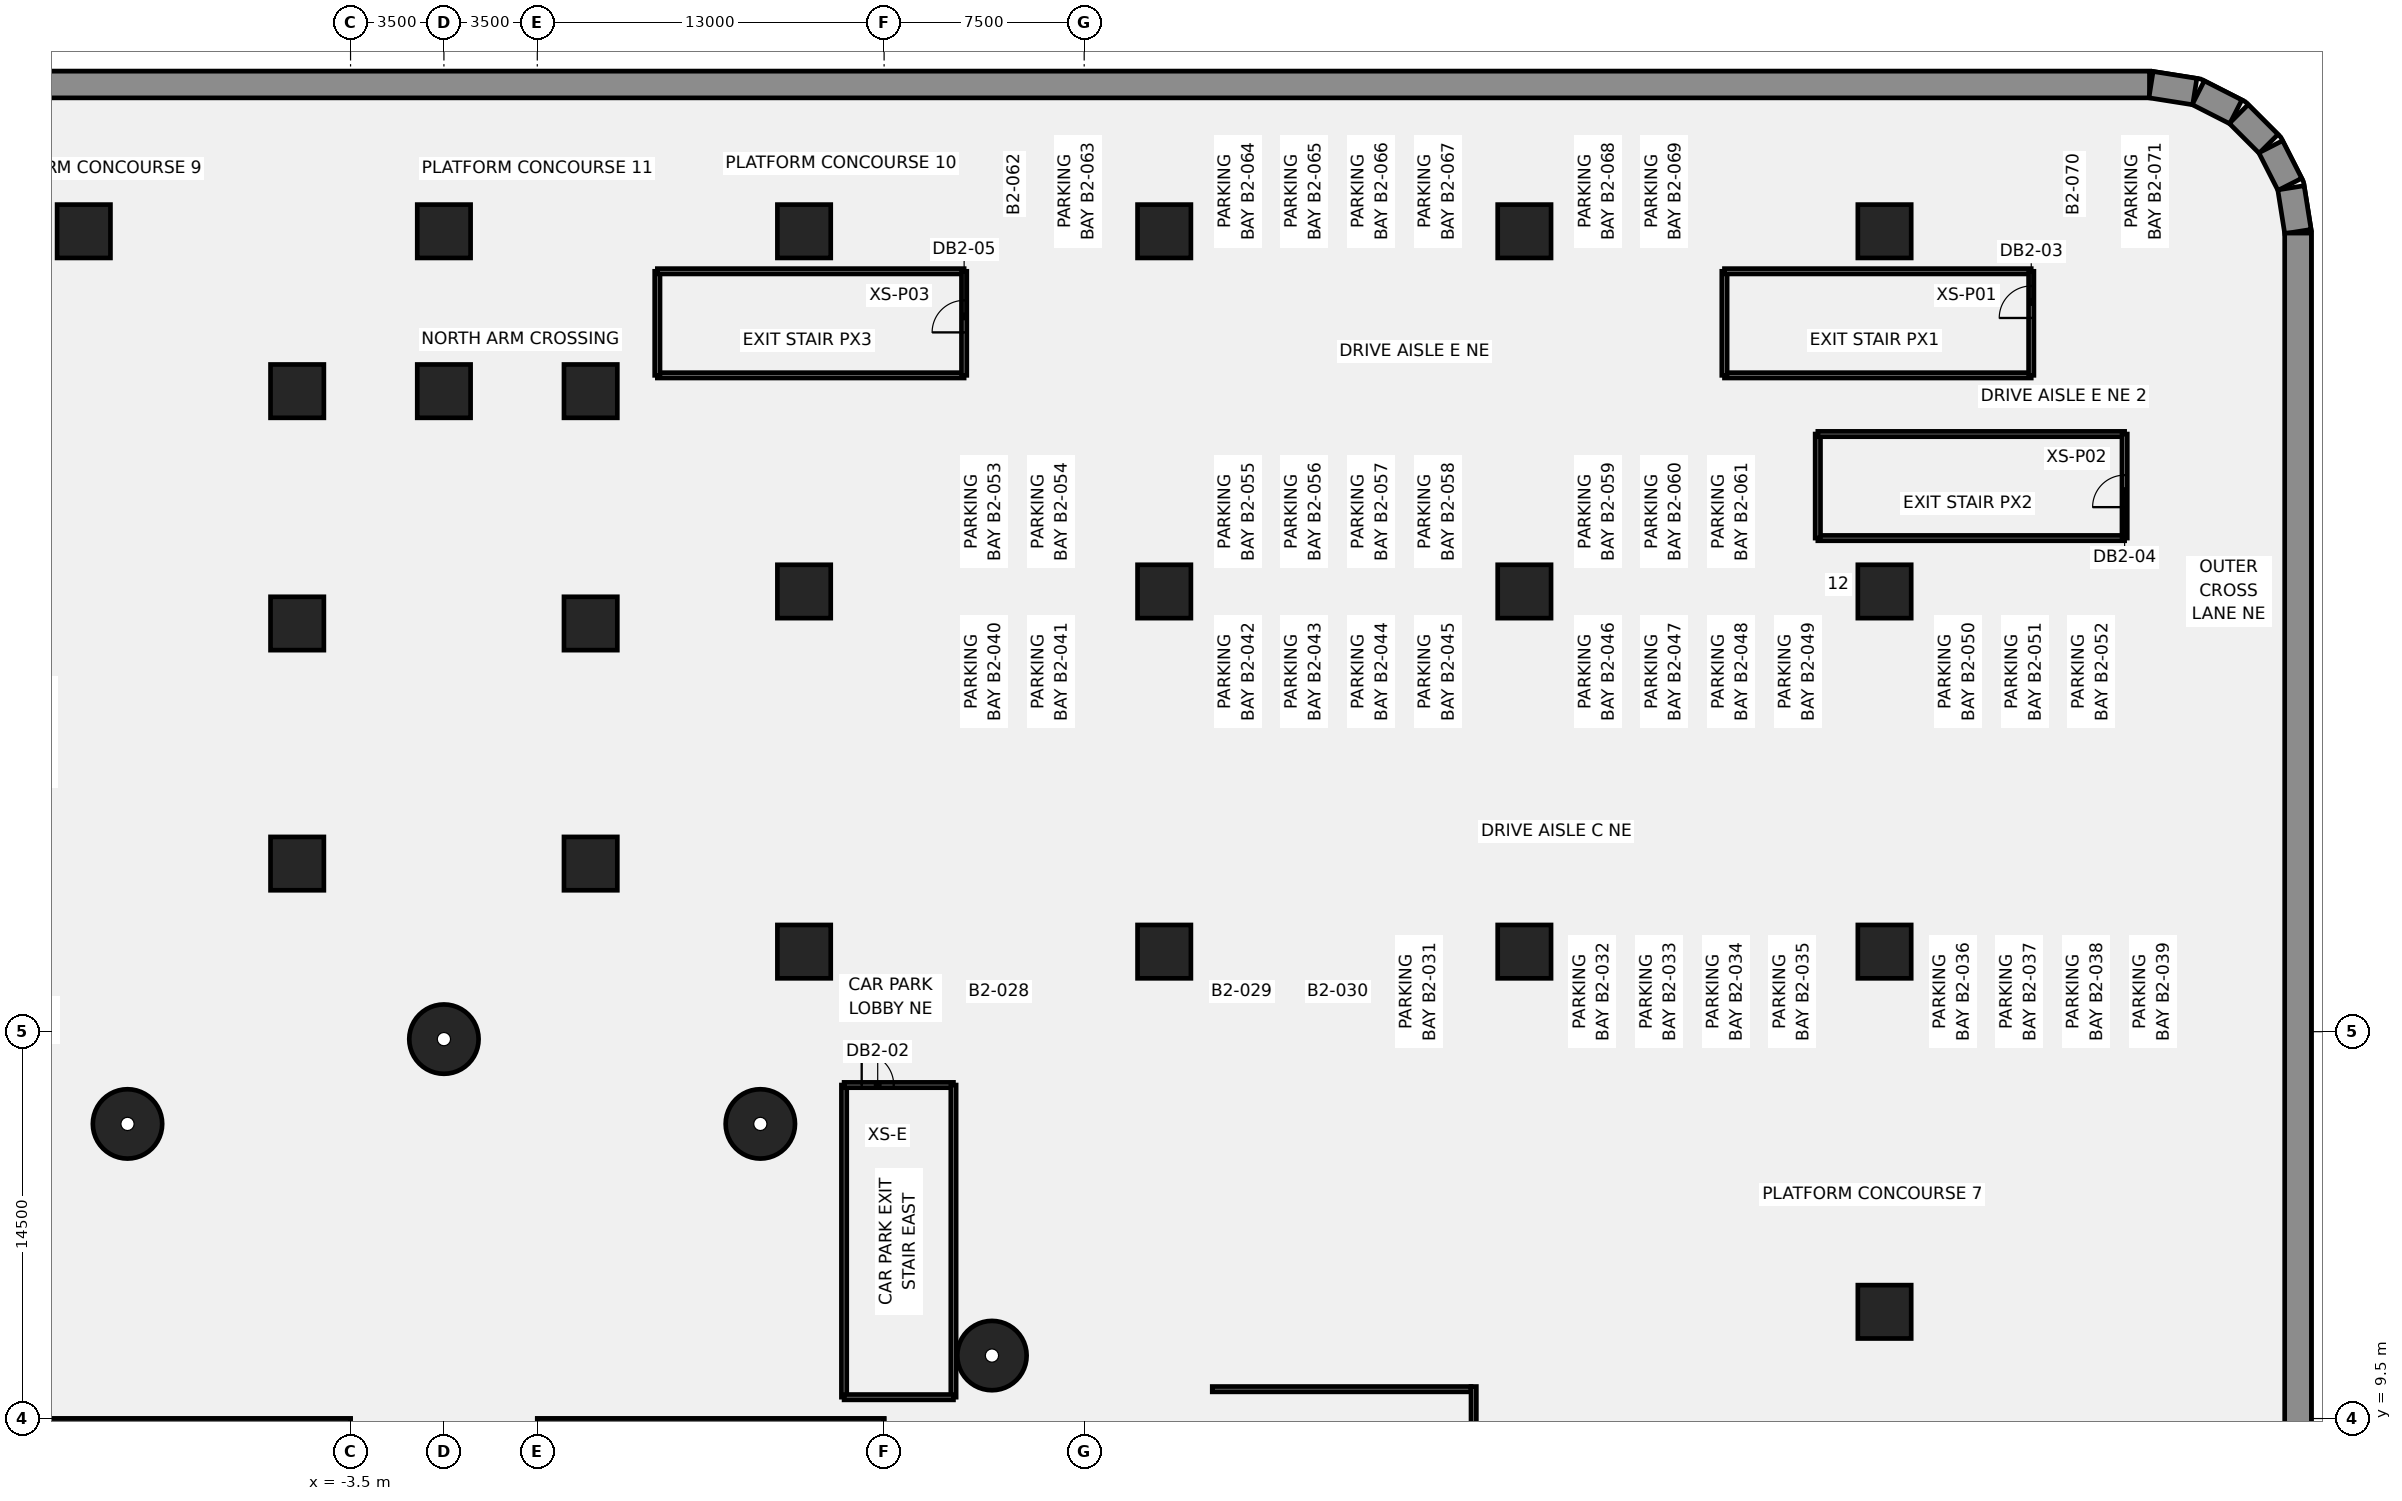
"""IFC4 building model, lengths in metres.
Left out: names, types, materials, properties, quantities, classifications, styles, units other than length and angle.
Written with IfcOpenShell. Run it as: python <this file> out.ifc"""

import sys

from ifc_helpers import new_model, si_unit, direction, frame, frame_2d, origin, origin_2d, place, context, subcontext, project, spatial, rectangle, circle, extrude, element, fill, save


model = new_model("IFC4")
c1 = context("Model", 3, precision=1e-05, world=origin(), true_north=direction((0.0, 1.0)))
c2 = subcontext(c1, "Body", "Model", "MODEL_VIEW")
j1 = project(units=[si_unit("LENGTHUNIT", "METRE"), si_unit("PLANEANGLEUNIT", "RADIAN")], contexts=[c1])
p1 = place(None, origin())
s1 = spatial("IfcSite", under=j1, at=p1, CompositionType="ELEMENT")
p2 = place(p1, origin())
s2 = spatial("IfcBuilding", under=s1, at=p2, CompositionType="ELEMENT")
p3 = place(p2, frame((0.0, 0.0, -14.0)))
s3 = spatial("IfcBuildingStorey", under=s2, at=p3, CompositionType="ELEMENT", Elevation=-14.0)
p4 = place(p3, frame((-63.931, 59.5, -0.45), z_axis=(0.0, 0.0, 1.0), x_axis=(1.0, 0.0, 0.0)))
e1 = element("IfcWall", 1, at=p4, inside=s3, PredefinedType="SOLIDWALL", context=c2, shape_type="SweptSolid", body=[
    extrude(rectangle(XDim=127.863, YDim=1.0, at=frame_2d((63.931, 0.0))), origin(), (0.0, 0.0, 1.0), 7.0),
])
p5 = place(p3, frame((63.99, 59.495, -0.45), z_axis=(0.0, 0.0, 1.0), x_axis=(0.987688946427, -0.156430639922, 0.0)))
e2 = element("IfcWall", 2, at=p5, inside=s3, PredefinedType="SOLIDWALL", context=c2, shape_type="SweptSolid", body=[
    extrude(rectangle(XDim=1.661, YDim=1.0, at=frame_2d((0.83, 0.0))), origin(), (0.0, 0.0, 1.0), 7.0),
])
for number, where, z_axis, x_axis in (
    (3, (65.759, 59.194, -0.45), (0.0, 0.0, 1.0), (0.891, -0.454, 0.0)),
    (4, (67.278, 58.396, -0.45), (0.0, 0.0, 1.0), (0.707, -0.707, 0.0)),
    (5, (68.476, 57.168, -0.45), (0.0, 0.0, 1.0), (0.454, -0.891, 0.0)),
):
    element("IfcWall", number, at=place(p3, frame(where, z_axis=z_axis, x_axis=x_axis)), inside=s3, PredefinedType="SOLIDWALL", context=c2, shape_type="SweptSolid", body=[
        extrude(rectangle(XDim=1.581, YDim=1.0, at=frame_2d((0.791, 0.0))), origin(), (0.0, 0.0, 1.0), 7.0),
    ])
p6 = place(p3, frame((69.236, 55.63, -0.45), z_axis=(0.0, 0.0, 1.0), x_axis=(0.156430639922, -0.987688946427, 0.0)))
e6 = element("IfcWall", 6, at=p6, inside=s3, PredefinedType="SOLIDWALL", context=c2, shape_type="SweptSolid", body=[
    extrude(rectangle(XDim=1.661, YDim=1.0, at=frame_2d((0.83, 0.0))), origin(), (0.0, 0.0, 1.0), 7.0),
])
p7 = place(p3, frame((69.5, 53.931, -0.45), z_axis=(0.0, 0.0, 1.0), x_axis=(0.0, -1.0, 0.0)))
e7 = element("IfcWall", 7, at=p7, inside=s3, PredefinedType="SOLIDWALL", context=c2, shape_type="SweptSolid", body=[
    extrude(rectangle(XDim=107.863, YDim=1.0, at=frame_2d((53.931, 0.0))), origin(), (0.0, 0.0, 1.0), 7.0),
])
for number, where, z_axis, x_axis in (
    (8, (20.543, 11.86, -0.45), (0.0, 0.0, 1.0), (1.0, 0.0, 0.0)),
    (9, (11.86, 20.543, -0.45), (0.0, 0.0, 1.0), (1.0, 0.0, 0.0)),
    (10, (0.0, 23.721, -0.45), (0.0, 0.0, 1.0), (1.0, 0.0, 0.0)),
    (11, (-11.86, 20.543, -0.45), (0.0, 0.0, 1.0), (1.0, 0.0, 0.0)),
):
    element("IfcColumn", number, at=place(p3, frame(where, z_axis=z_axis, x_axis=x_axis)), inside=s3, PredefinedType="COLUMN", context=c2, shape_type="SweptSolid", body=[
        extrude(circle(Radius=1.3, at=origin_2d()), origin(), (0.0, 0.0, 1.0), 7.0),
    ])
for number, where, z_axis, x_axis in (
    (12, (-5.5, 39.3, -0.45), (0.0, 0.0, 1.0), (1.0, 0.0, 0.0)),
    (13, (5.5, 39.3, -0.45), (0.0, 0.0, 1.0), (1.0, 0.0, 0.0)),
    (14, (-5.5, 30.3, -0.45), (0.0, 0.0, 1.0), (1.0, 0.0, 0.0)),
    (15, (5.5, 30.3, -0.45), (0.0, 0.0, 1.0), (1.0, 0.0, 0.0)),
    (16, (5.5, 48.008, -0.45), (0.0, 0.0, 1.0), (1.0, 0.0, 0.0)),
    (17, (0.0, 48.008, -0.45), (0.0, 0.0, 1.0), (1.0, 0.0, 0.0)),
    (18, (-5.5, 48.008, -0.45), (0.0, 0.0, 1.0), (1.0, 0.0, 0.0)),
    (19, (-13.5, 54.0, -0.45), (0.0, 0.0, 1.0), (1.0, 0.0, 0.0)),
    (20, (0.0, 54.0, -0.45), (0.0, 0.0, 1.0), (1.0, 0.0, 0.0)),
    (21, (13.5, 27.0, -0.45), (0.0, 0.0, 1.0), (1.0, 0.0, 0.0)),
    (22, (13.5, 40.5, -0.45), (0.0, 0.0, 1.0), (1.0, 0.0, 0.0)),
    (23, (13.5, 54.0, -0.45), (0.0, 0.0, 1.0), (1.0, 0.0, 0.0)),
    (24, (27.0, 27.0, -0.45), (0.0, 0.0, 1.0), (1.0, 0.0, 0.0)),
    (25, (27.0, 40.5, -0.45), (0.0, 0.0, 1.0), (1.0, 0.0, 0.0)),
    (26, (27.0, 54.0, -0.45), (0.0, 0.0, 1.0), (1.0, 0.0, 0.0)),
    (27, (40.5, 27.0, -0.45), (0.0, 0.0, 1.0), (1.0, 0.0, 0.0)),
    (28, (40.5, 40.5, -0.45), (0.0, 0.0, 1.0), (1.0, 0.0, 0.0)),
    (29, (40.5, 54.0, -0.45), (0.0, 0.0, 1.0), (1.0, 0.0, 0.0)),
    (30, (54.0, 13.5, -0.45), (0.0, 0.0, 1.0), (1.0, 0.0, 0.0)),
    (31, (54.0, 27.0, -0.45), (0.0, 0.0, 1.0), (1.0, 0.0, 0.0)),
    (32, (54.0, 40.5, -0.45), (0.0, 0.0, 1.0), (1.0, 0.0, 0.0)),
    (33, (54.0, 54.0, -0.45), (0.0, 0.0, 1.0), (1.0, 0.0, 0.0)),
):
    element("IfcColumn", number, at=place(p3, frame(where, z_axis=z_axis, x_axis=x_axis)), inside=s3, PredefinedType="COLUMN", context=c2, shape_type="SweptSolid", body=[
        extrude(rectangle(XDim=2.0, YDim=2.0, at=origin_2d()), origin(), (0.0, 0.0, 1.0), 7.0),
    ])
p8 = place(p3, frame((15.0, 10.3, 0.0), z_axis=(0.0, 0.0, 1.0), x_axis=(0.0, 1.0, 0.0)))
e34 = element("IfcWall", 34, at=p8, inside=s3, PredefinedType="PARTITIONING", context=c2, shape_type="SweptSolid", body=[
    extrude(rectangle(XDim=11.7, YDim=0.2, at=frame_2d((5.85, 0.0))), origin(), (0.0, 0.0, 1.0), 6.55),
])
p9 = place(p3, frame((15.0, 22.0, 0.0), z_axis=(0.0, 0.0, 1.0), x_axis=(1.0, 0.0, 0.0)))
e35 = element("IfcWall", 35, at=p9, inside=s3, PredefinedType="PARTITIONING", context=c2, shape_type="SweptSolid", body=[
    extrude(rectangle(XDim=4.1, YDim=0.2, at=frame_2d((2.05, 0.0))), origin(), (0.0, 0.0, 1.0), 6.55),
])
p10 = place(p9, frame((0.66, 0.0, 0.0)))
e36 = element("IfcOpeningElement", 36, at=p10, cuts=e35, PredefinedType="OPENING", context=c2, shape_type="SweptSolid", body=[
    extrude(rectangle(XDim=1.2, YDim=2.1, at=frame_2d((0.6, 1.05))), frame((0.0, 0.11, 0.0), z_axis=(0.0, -1.0, 0.0), x_axis=(1.0, 0.0, 0.0)), (0.0, 0.0, 1.0), 0.22),
])
p11 = place(p3, frame((19.1, 10.3, 0.0), z_axis=(0.0, 0.0, 1.0), x_axis=(0.0, 1.0, 0.0)))
e37 = element("IfcWall", 37, at=p11, inside=s3, PredefinedType="PARTITIONING", context=c2, shape_type="SweptSolid", body=[
    extrude(rectangle(XDim=11.7, YDim=0.2, at=frame_2d((5.85, 0.0))), origin(), (0.0, 0.0, 1.0), 6.55),
])
p12 = place(p3, frame((15.0, 10.3, 0.0), z_axis=(0.0, 0.0, 1.0), x_axis=(1.0, 0.0, 0.0)))
e38 = element("IfcWall", 38, at=p12, inside=s3, PredefinedType="PARTITIONING", context=c2, shape_type="SweptSolid", body=[
    extrude(rectangle(XDim=4.1, YDim=0.2, at=frame_2d((2.05, 0.0))), origin(), (0.0, 0.0, 1.0), 6.55),
])
p13 = place(p3, frame((8.0, 48.6, 0.0), z_axis=(0.0, 0.0, 1.0), x_axis=(1.0, 0.0, 0.0)))
e39 = element("IfcWall", 39, at=p13, inside=s3, PredefinedType="PARTITIONING", context=c2, shape_type="SweptSolid", body=[
    extrude(rectangle(XDim=11.5, YDim=0.2, at=frame_2d((5.75, 0.0))), origin(), (0.0, 0.0, 1.0), 6.55),
])
p14 = place(p3, frame((8.0, 48.6, 0.0), z_axis=(0.0, 0.0, 1.0), x_axis=(0.0, 1.0, 0.0)))
e40 = element("IfcWall", 40, at=p14, inside=s3, PredefinedType="PARTITIONING", context=c2, shape_type="SweptSolid", body=[
    extrude(rectangle(XDim=3.9, YDim=0.2, at=frame_2d((1.95, 0.0))), origin(), (0.0, 0.0, 1.0), 6.55),
])
p15 = place(p3, frame((8.0, 52.5, 0.0), z_axis=(0.0, 0.0, 1.0), x_axis=(1.0, 0.0, 0.0)))
e41 = element("IfcWall", 41, at=p15, inside=s3, PredefinedType="PARTITIONING", context=c2, shape_type="SweptSolid", body=[
    extrude(rectangle(XDim=11.5, YDim=0.2, at=frame_2d((5.75, 0.0))), origin(), (0.0, 0.0, 1.0), 6.55),
])
p16 = place(p3, frame((19.5, 48.6, 0.0), z_axis=(0.0, 0.0, 1.0), x_axis=(0.0, 1.0, 0.0)))
e42 = element("IfcWall", 42, at=p16, inside=s3, PredefinedType="PARTITIONING", context=c2, shape_type="SweptSolid", body=[
    extrude(rectangle(XDim=3.9, YDim=0.2, at=frame_2d((1.95, 0.0))), origin(), (0.0, 0.0, 1.0), 6.55),
])
p17 = place(p16, frame((1.61, 0.0, 0.0)))
e43 = element("IfcOpeningElement", 43, at=p17, cuts=e42, PredefinedType="OPENING", context=c2, shape_type="SweptSolid", body=[
    extrude(rectangle(XDim=1.2, YDim=2.1, at=frame_2d((0.6, 1.05))), frame((0.0, 0.11, 0.0), z_axis=(0.0, -1.0, 0.0), x_axis=(1.0, 0.0, 0.0)), (0.0, 0.0, 1.0), 0.22),
])
p18 = place(p3, frame((48.0, 48.6, 0.0), z_axis=(0.0, 0.0, 1.0), x_axis=(1.0, 0.0, 0.0)))
e44 = element("IfcWall", 44, at=p18, inside=s3, PredefinedType="PARTITIONING", context=c2, shape_type="SweptSolid", body=[
    extrude(rectangle(XDim=11.5, YDim=0.2, at=frame_2d((5.75, 0.0))), origin(), (0.0, 0.0, 1.0), 6.55),
])
p19 = place(p3, frame((48.0, 48.6, 0.0), z_axis=(0.0, 0.0, 1.0), x_axis=(0.0, 1.0, 0.0)))
e45 = element("IfcWall", 45, at=p19, inside=s3, PredefinedType="PARTITIONING", context=c2, shape_type="SweptSolid", body=[
    extrude(rectangle(XDim=3.9, YDim=0.2, at=frame_2d((1.95, 0.0))), origin(), (0.0, 0.0, 1.0), 6.55),
])
p20 = place(p3, frame((48.0, 52.5, 0.0), z_axis=(0.0, 0.0, 1.0), x_axis=(1.0, 0.0, 0.0)))
e46 = element("IfcWall", 46, at=p20, inside=s3, PredefinedType="PARTITIONING", context=c2, shape_type="SweptSolid", body=[
    extrude(rectangle(XDim=11.5, YDim=0.2, at=frame_2d((5.75, 0.0))), origin(), (0.0, 0.0, 1.0), 6.55),
])
p21 = place(p3, frame((59.5, 48.6, 0.0), z_axis=(0.0, 0.0, 1.0), x_axis=(0.0, 1.0, 0.0)))
e47 = element("IfcWall", 47, at=p21, inside=s3, PredefinedType="PARTITIONING", context=c2, shape_type="SweptSolid", body=[
    extrude(rectangle(XDim=3.9, YDim=0.2, at=frame_2d((1.95, 0.0))), origin(), (0.0, 0.0, 1.0), 6.55),
])
p22 = place(p21, frame((2.15, 0.0, 0.0)))
e48 = element("IfcOpeningElement", 48, at=p22, cuts=e47, PredefinedType="OPENING", context=c2, shape_type="SweptSolid", body=[
    extrude(rectangle(XDim=1.2, YDim=2.1, at=frame_2d((0.6, 1.05))), frame((0.0, 0.11, 0.0), z_axis=(0.0, -1.0, 0.0), x_axis=(1.0, 0.0, 0.0)), (0.0, 0.0, 1.0), 0.22),
])
p23 = place(p3, frame((51.5, 42.5, 0.0), z_axis=(0.0, 0.0, 1.0), x_axis=(1.0, 0.0, 0.0)))
e49 = element("IfcWall", 49, at=p23, inside=s3, PredefinedType="PARTITIONING", context=c2, shape_type="SweptSolid", body=[
    extrude(rectangle(XDim=11.5, YDim=0.2, at=frame_2d((5.75, 0.0))), origin(), (0.0, 0.0, 1.0), 6.55),
])
p24 = place(p3, frame((51.5, 42.5, 0.0), z_axis=(0.0, 0.0, 1.0), x_axis=(0.0, 1.0, 0.0)))
e50 = element("IfcWall", 50, at=p24, inside=s3, PredefinedType="PARTITIONING", context=c2, shape_type="SweptSolid", body=[
    extrude(rectangle(XDim=3.9, YDim=0.2, at=frame_2d((1.95, 0.0))), origin(), (0.0, 0.0, 1.0), 6.55),
])
p25 = place(p3, frame((51.5, 46.4, 0.0), z_axis=(0.0, 0.0, 1.0), x_axis=(1.0, 0.0, 0.0)))
e51 = element("IfcWall", 51, at=p25, inside=s3, PredefinedType="PARTITIONING", context=c2, shape_type="SweptSolid", body=[
    extrude(rectangle(XDim=11.5, YDim=0.2, at=frame_2d((5.75, 0.0))), origin(), (0.0, 0.0, 1.0), 6.55),
])
p26 = place(p3, frame((63.0, 42.5, 0.0), z_axis=(0.0, 0.0, 1.0), x_axis=(0.0, 1.0, 0.0)))
e52 = element("IfcWall", 52, at=p26, inside=s3, PredefinedType="PARTITIONING", context=c2, shape_type="SweptSolid", body=[
    extrude(rectangle(XDim=3.9, YDim=0.2, at=frame_2d((1.95, 0.0))), origin(), (0.0, 0.0, 1.0), 6.55),
])
p27 = place(p26, frame((1.16, 0.0, 0.0)))
e53 = element("IfcOpeningElement", 53, at=p27, cuts=e52, PredefinedType="OPENING", context=c2, shape_type="SweptSolid", body=[
    extrude(rectangle(XDim=1.2, YDim=2.1, at=frame_2d((0.6, 1.05))), frame((0.0, 0.11, 0.0), z_axis=(0.0, -1.0, 0.0), x_axis=(1.0, 0.0, 0.0)), (0.0, 0.0, 1.0), 0.22),
])
p28 = place(p3, frame((28.8, 10.6, 0.0), z_axis=(0.0, 0.0, 1.0), x_axis=(1.0, 0.0, 0.0)))
e54 = element("IfcWall", 54, at=p28, inside=s3, PredefinedType="SOLIDWALL", context=c2, shape_type="SweptSolid", body=[
    extrude(rectangle(XDim=9.7, YDim=0.2, at=frame_2d((4.85, 0.0))), origin(), (0.0, 0.0, 1.0), 6.55),
])
p29 = place(p3, frame((38.6, 6.4, 0.0), z_axis=(0.0, 0.0, 1.0), x_axis=(0.0, 1.0, 0.0)))
e55 = element("IfcWall", 55, at=p29, inside=s3, PredefinedType="SOLIDWALL", context=c2, shape_type="SweptSolid", body=[
    extrude(rectangle(XDim=4.3, YDim=0.2, at=frame_2d((2.15, 0.0))), origin(), (0.0, 0.0, 1.0), 6.55),
])
for number, where, z_axis, x_axis in (
    (56, (-16.5, 9.15, 0.0), (0.0, 0.0, 1.0), (1.0, 0.0, 0.0)),
    (57, (16.5, 9.15, 0.0), (0.0, 0.0, 1.0), (-1.0, 0.0, 0.0)),
):
    element("IfcWall", number, at=place(p3, frame(where, z_axis=z_axis, x_axis=x_axis)), inside=s3, PredefinedType="SHEAR", context=c2, shape_type="SweptSolid", body=[
        extrude(rectangle(XDim=13.0, YDim=0.7, at=frame_2d((6.5, 0.0))), origin(), (0.0, 0.0, 1.0), 6.55),
    ])
p30 = place(p10, origin())
e58 = element("IfcDoor", 58, at=p30, inside=s3, OperationType="SINGLE_SWING_RIGHT", PredefinedType="DOOR", context=c2, shape_type="SweptSolid", body=[
    extrude(rectangle(XDim=1.2, YDim=2.1, at=frame_2d((0.6, 1.05))), frame((0.0, 0.025, 0.0), z_axis=(0.0, -1.0, 0.0), x_axis=(1.0, 0.0, 0.0)), (0.0, 0.0, 1.0), 0.05),
])
fill(e36, e58)
p31 = place(p22, origin())
e59 = element("IfcDoor", 59, at=p31, inside=s3, OperationType="SINGLE_SWING_LEFT", PredefinedType="DOOR", context=c2, shape_type="SweptSolid", body=[
    extrude(rectangle(XDim=1.2, YDim=2.1, at=frame_2d((0.6, 1.05))), frame((0.0, 0.025, 0.0), z_axis=(0.0, -1.0, 0.0), x_axis=(1.0, 0.0, 0.0)), (0.0, 0.0, 1.0), 0.05),
])
fill(e48, e59)
p32 = place(p27, origin())
e60 = element("IfcDoor", 60, at=p32, inside=s3, OperationType="SINGLE_SWING_RIGHT", PredefinedType="DOOR", context=c2, shape_type="SweptSolid", body=[
    extrude(rectangle(XDim=1.2, YDim=2.1, at=frame_2d((0.6, 1.05))), frame((0.0, 0.025, 0.0), z_axis=(0.0, -1.0, 0.0), x_axis=(1.0, 0.0, 0.0)), (0.0, 0.0, 1.0), 0.05),
])
fill(e53, e60)
p33 = place(p17, origin())
e61 = element("IfcDoor", 61, at=p33, inside=s3, OperationType="SINGLE_SWING_LEFT", PredefinedType="DOOR", context=c2, shape_type="SweptSolid", body=[
    extrude(rectangle(XDim=1.2, YDim=2.1, at=frame_2d((0.6, 1.05))), frame((0.0, 0.025, 0.0), z_axis=(0.0, -1.0, 0.0), x_axis=(1.0, 0.0, 0.0)), (0.0, 0.0, 1.0), 0.05),
])
fill(e43, e61)
save(model, sys.argv[1])
